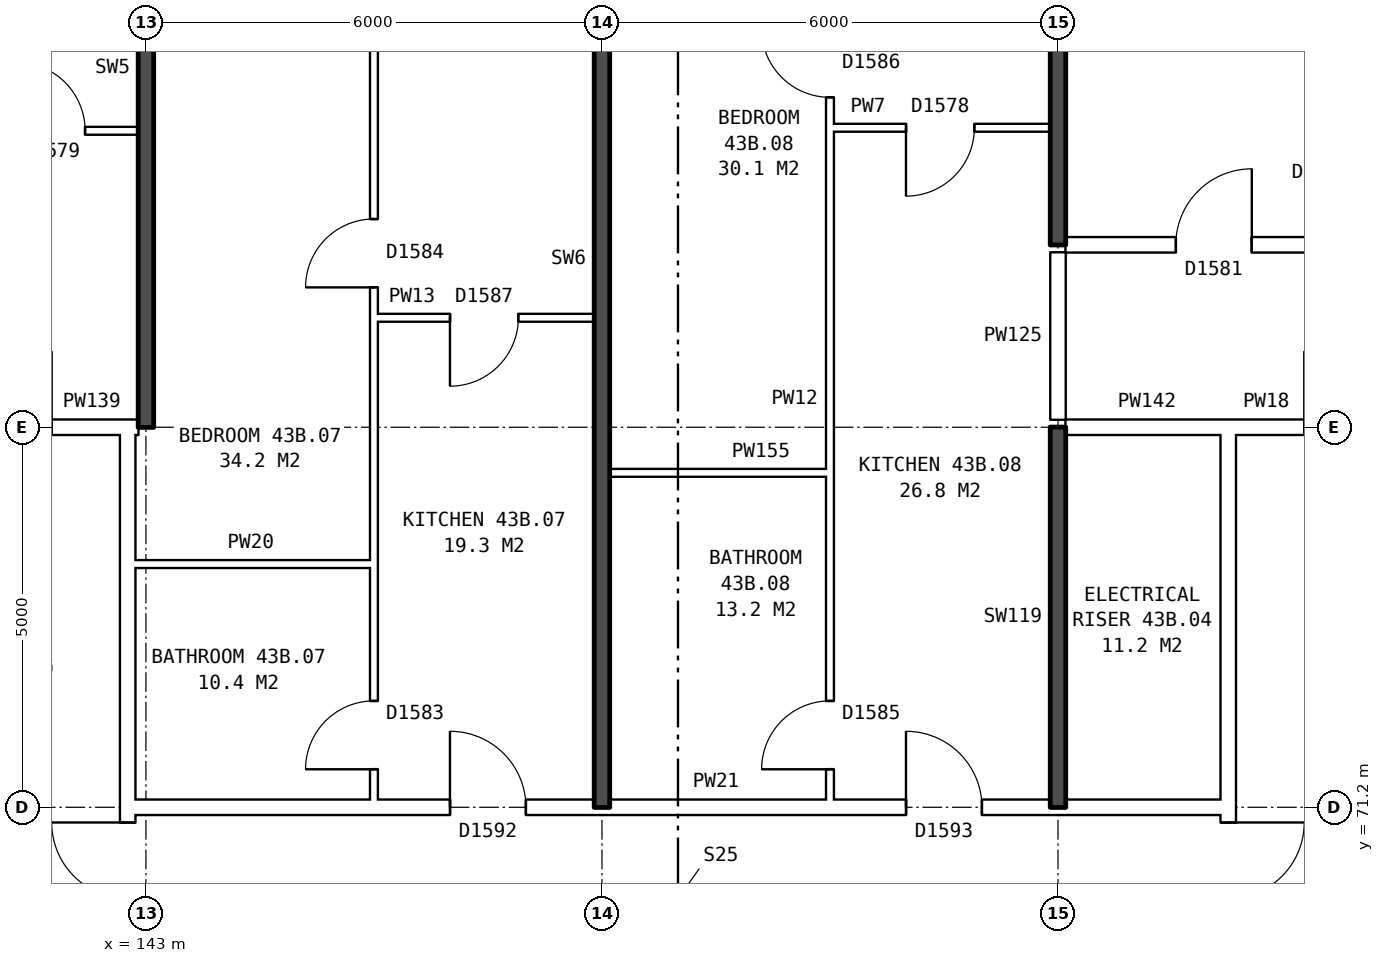
"""IFC4 building model, lengths in metres.
Left out: names, types, materials, properties, quantities, classifications, styles, units other than length and angle.
Written with IfcOpenShell. Run it as: python <this file> out.ifc"""

import sys

from ifc_helpers import new_model, si_unit, direction, frame, frame_2d, origin, place, context, subcontext, project, spatial, rectangle, extrude, element, fill, save


model = new_model("IFC4")
c1 = context("Model", 3, precision=1e-05, world=origin(), true_north=direction((0.0, 1.0)))
c2 = subcontext(c1, "Body", "Model", "MODEL_VIEW")
j1 = project(units=[si_unit("LENGTHUNIT", "METRE"), si_unit("PLANEANGLEUNIT", "RADIAN")], contexts=[c1])
p1 = place(None, origin())
s1 = spatial("IfcSite", under=j1, at=p1, CompositionType="ELEMENT")
p2 = place(p1, origin())
s2 = spatial("IfcBuilding", under=s1, at=p2, CompositionType="ELEMENT")
p3 = place(p2, frame((0.0, 0.0, 154.7)))
s3 = spatial("IfcBuildingStorey", under=s2, at=p3, CompositionType="ELEMENT", Elevation=154.7)
p4 = place(p3, frame((142.76, 63.9, 0.0), z_axis=(0.0, 0.0, 1.0), x_axis=(0.0, 1.0, 0.0)))
e1 = element("IfcWall", 1, at=p4, inside=s3, PredefinedType="PARTITIONING", context=c2, shape_type="SweptSolid", body=[
    extrude(rectangle(XDim=12.2, YDim=0.2, at=frame_2d((6.1, 0.0))), origin(), (0.0, 0.0, 1.0), 2.85),
])
p5 = place(p4, frame((5.1, 0.0, 0.0)))
e2 = element("IfcOpeningElement", 2, at=p5, cuts=e1, PredefinedType="OPENING", context=c2, shape_type="SweptSolid", body=[
    extrude(rectangle(XDim=2.0, YDim=2.1, at=frame_2d((1.0, 1.05))), frame((0.0, 0.11, 0.0), z_axis=(0.0, -1.0, 0.0), x_axis=(1.0, 0.0, 0.0)), (0.0, 0.0, 1.0), 0.22),
])
p6 = place(p3, frame((157.24, 63.9, 0.0), z_axis=(0.0, 0.0, 1.0), x_axis=(0.0, 1.0, 0.0)))
e3 = element("IfcWall", 3, at=p6, inside=s3, PredefinedType="PARTITIONING", context=c2, shape_type="SweptSolid", body=[
    extrude(rectangle(XDim=12.2, YDim=0.2, at=frame_2d((6.1, 0.0))), origin(), (0.0, 0.0, 1.0), 2.85),
])
p7 = place(p6, frame((5.1, 0.0, 0.0)))
e4 = element("IfcOpeningElement", 4, at=p7, cuts=e3, PredefinedType="OPENING", context=c2, shape_type="SweptSolid", body=[
    extrude(rectangle(XDim=2.0, YDim=2.1, at=frame_2d((1.0, 1.05))), frame((0.0, 0.11, 0.0), z_axis=(0.0, -1.0, 0.0), x_axis=(1.0, 0.0, 0.0)), (0.0, 0.0, 1.0), 0.22),
])
p8 = place(p3, frame((142.76, 71.2, 0.0), z_axis=(0.0, 0.0, 1.0), x_axis=(1.0, 0.0, 0.0)))
e5 = element("IfcWall", 5, at=p8, inside=s3, PredefinedType="PARTITIONING", context=c2, shape_type="SweptSolid", body=[
    extrude(rectangle(XDim=14.48, YDim=0.2, at=frame_2d((7.24, 0.0))), origin(), (0.0, 0.0, 1.0), 2.85),
])
p9 = place(p8, frame((4.24, 0.0, 0.0)))
e6 = element("IfcOpeningElement", 6, at=p9, cuts=e5, PredefinedType="OPENING", context=c2, shape_type="SweptSolid", body=[
    extrude(rectangle(XDim=1.0, YDim=2.1, at=frame_2d((0.5, 1.05))), frame((0.0, 0.11, 0.0), z_axis=(0.0, -1.0, 0.0), x_axis=(1.0, 0.0, 0.0)), (0.0, 0.0, 1.0), 0.22),
])
p10 = place(p8, frame((10.24, 0.0, 0.0)))
e7 = element("IfcOpeningElement", 7, at=p10, cuts=e5, PredefinedType="OPENING", context=c2, shape_type="SweptSolid", body=[
    extrude(rectangle(XDim=1.0, YDim=2.1, at=frame_2d((0.5, 1.05))), frame((0.0, 0.11, 0.0), z_axis=(0.0, -1.0, 0.0), x_axis=(1.0, 0.0, 0.0)), (0.0, 0.0, 1.0), 0.22),
])
p11 = place(p3, frame((142.76, 74.4, 0.0), z_axis=(0.0, 0.0, 1.0), x_axis=(1.0, 0.0, 0.0)))
e8 = element("IfcWall", 8, at=p11, inside=s3, PredefinedType="PARTITIONING", context=c2, shape_type="SweptSolid", body=[
    extrude(rectangle(XDim=3.24, YDim=0.1, at=frame_2d((1.62, 0.0))), origin(), (0.0, 0.0, 1.0), 2.85),
])
p12 = place(p3, frame((149.1, 75.6, 0.0), z_axis=(0.0, 0.0, 1.0), x_axis=(1.0, 0.0, 0.0)))
e9 = element("IfcWall", 9, at=p12, inside=s3, PredefinedType="PARTITIONING", context=c2, shape_type="SweptSolid", body=[
    extrude(rectangle(XDim=2.9, YDim=0.1, at=frame_2d((1.45, 0.0))), origin(), (0.0, 0.0, 1.0), 2.85),
])
p13 = place(p3, frame((139.76, 76.2, 0.0), z_axis=(0.0, 0.0, 1.0), x_axis=(1.0, 0.0, 0.0)))
e10 = element("IfcWall", 10, at=p13, inside=s3, PredefinedType="PARTITIONING", context=c2, shape_type="SweptSolid", body=[
    extrude(rectangle(XDim=3.0, YDim=0.2, at=frame_2d((1.5, 0.0))), origin(), (0.0, 0.0, 1.0), 2.85),
])
p14 = place(p13, frame((1.0, 0.0, 0.0)))
e11 = element("IfcOpeningElement", 11, at=p14, cuts=e10, PredefinedType="OPENING", context=c2, shape_type="SweptSolid", body=[
    extrude(rectangle(XDim=1.0, YDim=2.1, at=frame_2d((0.5, 1.05))), frame((0.0, 0.11, 0.0), z_axis=(0.0, -1.0, 0.0), x_axis=(1.0, 0.0, 0.0)), (0.0, 0.0, 1.0), 0.22),
])
p15 = place(p3, frame((142.76, 76.2, 0.0), z_axis=(0.0, 0.0, 1.0), x_axis=(1.0, 0.0, 0.0)))
e12 = element("IfcWall", 12, at=p15, inside=s3, PredefinedType="PARTITIONING", context=c2, shape_type="SweptSolid", body=[
    extrude(rectangle(XDim=0.14, YDim=0.2, at=frame_2d((0.07, 0.0))), origin(), (0.0, 0.0, 1.0), 2.85),
])
p16 = place(p3, frame((155.1, 76.2, 0.0), z_axis=(0.0, 0.0, 1.0), x_axis=(1.0, 0.0, 0.0)))
e13 = element("IfcWall", 13, at=p16, inside=s3, PredefinedType="PARTITIONING", context=c2, shape_type="SweptSolid", body=[
    extrude(rectangle(XDim=2.14, YDim=0.2, at=frame_2d((1.07, 0.0))), origin(), (0.0, 0.0, 1.0), 2.85),
])
p17 = place(p3, frame((157.24, 76.2, 0.0), z_axis=(0.0, 0.0, 1.0), x_axis=(1.0, 0.0, 0.0)))
e14 = element("IfcWall", 14, at=p17, inside=s3, PredefinedType="PARTITIONING", context=c2, shape_type="SweptSolid", body=[
    extrude(rectangle(XDim=3.0, YDim=0.2, at=frame_2d((1.5, 0.0))), origin(), (0.0, 0.0, 1.0), 2.85),
])
p18 = place(p17, frame((1.0, 0.0, 0.0)))
e15 = element("IfcOpeningElement", 15, at=p18, cuts=e14, PredefinedType="OPENING", context=c2, shape_type="SweptSolid", body=[
    extrude(rectangle(XDim=1.0, YDim=2.1, at=frame_2d((0.5, 1.05))), frame((0.0, 0.11, 0.0), z_axis=(0.0, -1.0, 0.0), x_axis=(1.0, 0.0, 0.0)), (0.0, 0.0, 1.0), 0.22),
])
p19 = place(p3, frame((146.0, 77.64, 0.0), z_axis=(0.0, 0.0, 1.0), x_axis=(1.0, 0.0, 0.0)))
e16 = element("IfcWall", 16, at=p19, inside=s3, PredefinedType="PARTITIONING", context=c2, shape_type="SweptSolid", body=[
    extrude(rectangle(XDim=2.9, YDim=0.1, at=frame_2d((1.45, 0.0))), origin(), (0.0, 0.0, 1.0), 2.85),
])
p20 = place(p19, frame((1.0, 0.0, 0.0)))
e17 = element("IfcOpeningElement", 17, at=p20, cuts=e16, PredefinedType="OPENING", context=c2, shape_type="SweptSolid", body=[
    extrude(rectangle(XDim=0.9, YDim=2.1, at=frame_2d((0.45, 1.05))), frame((0.0, 0.06, 0.0), z_axis=(0.0, -1.0, 0.0), x_axis=(1.0, 0.0, 0.0)), (0.0, 0.0, 1.0), 0.12),
])
p21 = place(p3, frame((155.1, 78.6, 0.0), z_axis=(0.0, 0.0, 1.0), x_axis=(1.0, 0.0, 0.0)))
e18 = element("IfcWall", 18, at=p21, inside=s3, PredefinedType="PARTITIONING", context=c2, shape_type="SweptSolid", body=[
    extrude(rectangle(XDim=16.04, YDim=0.2, at=frame_2d((8.02, 0.0))), origin(), (0.0, 0.0, 1.0), 2.85),
])
p22 = place(p21, frame((1.45, 0.0, 0.0)))
e19 = element("IfcOpeningElement", 19, at=p22, cuts=e18, PredefinedType="OPENING", context=c2, shape_type="SweptSolid", body=[
    extrude(rectangle(XDim=1.0, YDim=2.1, at=frame_2d((0.5, 1.05))), frame((0.0, 0.11, 0.0), z_axis=(0.0, -1.0, 0.0), x_axis=(1.0, 0.0, 0.0)), (0.0, 0.0, 1.0), 0.22),
])
p23 = place(p21, frame((8.4, 0.0, 0.0)))
e20 = element("IfcOpeningElement", 20, at=p23, cuts=e18, PredefinedType="OPENING", context=c2, shape_type="SweptSolid", body=[
    extrude(rectangle(XDim=1.0, YDim=2.1, at=frame_2d((0.5, 1.05))), frame((0.0, 0.11, 0.0), z_axis=(0.0, -1.0, 0.0), x_axis=(1.0, 0.0, 0.0)), (0.0, 0.0, 1.0), 0.22),
])
p24 = place(p3, frame((137.1, 80.1, 0.0), z_axis=(0.0, 0.0, 1.0), x_axis=(1.0, 0.0, 0.0)))
e21 = element("IfcWall", 21, at=p24, inside=s3, PredefinedType="PARTITIONING", context=c2, shape_type="SweptSolid", body=[
    extrude(rectangle(XDim=5.8, YDim=0.1, at=frame_2d((2.9, 0.0))), origin(), (0.0, 0.0, 1.0), 2.85),
])
p25 = place(p24, frame((1.3, 0.0, 0.0)))
e22 = element("IfcOpeningElement", 22, at=p25, cuts=e21, PredefinedType="OPENING", context=c2, shape_type="SweptSolid", body=[
    extrude(rectangle(XDim=0.9, YDim=2.1, at=frame_2d((0.45, 1.05))), frame((0.0, 0.06, 0.0), z_axis=(0.0, -1.0, 0.0), x_axis=(1.0, 0.0, 0.0)), (0.0, 0.0, 1.0), 0.12),
])
p26 = place(p24, frame((4.2, 0.0, 0.0)))
e23 = element("IfcOpeningElement", 23, at=p26, cuts=e21, PredefinedType="OPENING", context=c2, shape_type="SweptSolid", body=[
    extrude(rectangle(XDim=0.9, YDim=2.1, at=frame_2d((0.45, 1.05))), frame((0.0, 0.06, 0.0), z_axis=(0.0, -1.0, 0.0), x_axis=(1.0, 0.0, 0.0)), (0.0, 0.0, 1.0), 0.12),
])
p27 = place(p3, frame((152.0, 80.14, 0.0), z_axis=(0.0, 0.0, 1.0), x_axis=(1.0, 0.0, 0.0)))
e24 = element("IfcWall", 24, at=p27, inside=s3, PredefinedType="PARTITIONING", context=c2, shape_type="SweptSolid", body=[
    extrude(rectangle(XDim=2.9, YDim=0.1, at=frame_2d((1.45, 0.0))), origin(), (0.0, 0.0, 1.0), 2.85),
])
p28 = place(p27, frame((1.0, 0.0, 0.0)))
e25 = element("IfcOpeningElement", 25, at=p28, cuts=e24, PredefinedType="OPENING", context=c2, shape_type="SweptSolid", body=[
    extrude(rectangle(XDim=0.9, YDim=2.1, at=frame_2d((0.45, 1.05))), frame((0.0, 0.06, 0.0), z_axis=(0.0, -1.0, 0.0), x_axis=(1.0, 0.0, 0.0)), (0.0, 0.0, 1.0), 0.12),
])
p29 = place(p3, frame((143.0, 76.2, 0.0), z_axis=(0.0, 0.0, 1.0), x_axis=(0.0, 1.0, 0.0)))
e26 = element("IfcWall", 26, at=p29, inside=s3, PredefinedType="SOLIDWALL", context=c2, shape_type="SweptSolid", body=[
    extrude(rectangle(XDim=9.44, YDim=0.2, at=frame_2d((4.72, 0.0))), origin(), (0.0, 0.0, 1.0), 2.85),
])
p30 = place(p3, frame((146.0, 71.3, 0.0), z_axis=(0.0, 0.0, 1.0), x_axis=(0.0, 1.0, 0.0)))
e27 = element("IfcWall", 27, at=p30, inside=s3, PredefinedType="PARTITIONING", context=c2, shape_type="SweptSolid", body=[
    extrude(rectangle(XDim=14.34, YDim=0.1, at=frame_2d((7.17, 0.0))), origin(), (0.0, 0.0, 1.0), 2.85),
])
p31 = place(p30, frame((6.74, 0.0, 0.0)))
e28 = element("IfcOpeningElement", 28, at=p31, cuts=e27, PredefinedType="OPENING", context=c2, shape_type="SweptSolid", body=[
    extrude(rectangle(XDim=0.9, YDim=2.1, at=frame_2d((0.45, 1.05))), frame((0.0, 0.06, 0.0), z_axis=(0.0, -1.0, 0.0), x_axis=(1.0, 0.0, 0.0)), (0.0, 0.0, 1.0), 0.12),
])
p32 = place(p30, frame((0.4, 0.0, 0.0)))
e29 = element("IfcOpeningElement", 29, at=p32, cuts=e27, PredefinedType="OPENING", context=c2, shape_type="SweptSolid", body=[
    extrude(rectangle(XDim=0.9, YDim=2.1, at=frame_2d((0.45, 1.05))), frame((0.0, 0.06, 0.0), z_axis=(0.0, -1.0, 0.0), x_axis=(1.0, 0.0, 0.0)), (0.0, 0.0, 1.0), 0.12),
])
p33 = place(p3, frame((149.0, 71.2, 0.0), z_axis=(0.0, 0.0, 1.0), x_axis=(0.0, 1.0, 0.0)))
e30 = element("IfcWall", 30, at=p33, inside=s3, PredefinedType="SOLIDWALL", context=c2, shape_type="SweptSolid", body=[
    extrude(rectangle(XDim=14.44, YDim=0.2, at=frame_2d((7.22, 0.0))), origin(), (0.0, 0.0, 1.0), 2.85),
])
p34 = place(p3, frame((152.0, 71.3, 0.0), z_axis=(0.0, 0.0, 1.0), x_axis=(0.0, 1.0, 0.0)))
e31 = element("IfcWall", 31, at=p34, inside=s3, PredefinedType="PARTITIONING", context=c2, shape_type="SweptSolid", body=[
    extrude(rectangle(XDim=14.34, YDim=0.1, at=frame_2d((7.17, 0.0))), origin(), (0.0, 0.0, 1.0), 2.85),
])
p35 = place(p34, frame((9.24, 0.0, 0.0)))
e32 = element("IfcOpeningElement", 32, at=p35, cuts=e31, PredefinedType="OPENING", context=c2, shape_type="SweptSolid", body=[
    extrude(rectangle(XDim=0.9, YDim=2.1, at=frame_2d((0.45, 1.05))), frame((0.0, 0.06, 0.0), z_axis=(0.0, -1.0, 0.0), x_axis=(1.0, 0.0, 0.0)), (0.0, 0.0, 1.0), 0.12),
])
p36 = place(p34, frame((0.4, 0.0, 0.0)))
e33 = element("IfcOpeningElement", 33, at=p36, cuts=e31, PredefinedType="OPENING", context=c2, shape_type="SweptSolid", body=[
    extrude(rectangle(XDim=0.9, YDim=2.1, at=frame_2d((0.45, 1.05))), frame((0.0, 0.06, 0.0), z_axis=(0.0, -1.0, 0.0), x_axis=(1.0, 0.0, 0.0)), (0.0, 0.0, 1.0), 0.12),
])
p37 = place(p3, frame((155.0, 71.2, 0.0), z_axis=(0.0, 0.0, 1.0), x_axis=(0.0, 1.0, 0.0)))
e34 = element("IfcWall", 34, at=p37, inside=s3, PredefinedType="SOLIDWALL", context=c2, shape_type="SweptSolid", body=[
    extrude(rectangle(XDim=5.0, YDim=0.2, at=frame_2d((2.5, 0.0))), origin(), (0.0, 0.0, 1.0), 2.85),
])
p38 = place(p3, frame((155.0, 76.3, 0.0), z_axis=(0.0, 0.0, 1.0), x_axis=(0.0, 1.0, 0.0)))
e35 = element("IfcWall", 35, at=p38, inside=s3, PredefinedType="PARTITIONING", context=c2, shape_type="SweptSolid", body=[
    extrude(rectangle(XDim=2.2, YDim=0.2, at=frame_2d((1.1, 0.0))), origin(), (0.0, 0.0, 1.0), 2.85),
])
p39 = place(p3, frame((155.0, 78.6, 0.0), z_axis=(0.0, 0.0, 1.0), x_axis=(0.0, 1.0, 0.0)))
e36 = element("IfcWall", 36, at=p39, inside=s3, PredefinedType="SOLIDWALL", context=c2, shape_type="SweptSolid", body=[
    extrude(rectangle(XDim=7.04, YDim=0.2, at=frame_2d((3.52, 0.0))), origin(), (0.0, 0.0, 1.0), 2.85),
])
p40 = place(p5, origin())
e37 = element("IfcDoor", 37, at=p40, inside=s3, OperationType="DOUBLE_DOOR_SINGLE_SWING", PredefinedType="DOOR", context=c2, shape_type="SweptSolid", body=[
    extrude(rectangle(XDim=2.0, YDim=2.1, at=frame_2d((1.0, 1.05))), frame((0.0, 0.025, 0.0), z_axis=(0.0, -1.0, 0.0), x_axis=(1.0, 0.0, 0.0)), (0.0, 0.0, 1.0), 0.05),
])
fill(e2, e37)
p41 = place(p7, frame((2.0, 0.0, 0.0), z_axis=(0.0, 0.0, 1.0), x_axis=(-1.0, 0.0, 0.0)))
e38 = element("IfcDoor", 38, at=p41, inside=s3, OperationType="DOUBLE_DOOR_SINGLE_SWING", PredefinedType="DOOR", context=c2, shape_type="SweptSolid", body=[
    extrude(rectangle(XDim=2.0, YDim=2.1, at=frame_2d((1.0, 1.05))), frame((0.0, 0.025, 0.0), z_axis=(0.0, -1.0, 0.0), x_axis=(1.0, 0.0, 0.0)), (0.0, 0.0, 1.0), 0.05),
])
fill(e4, e38)
p42 = place(p26, origin())
e39 = element("IfcDoor", 39, at=p42, inside=s3, OperationType="SINGLE_SWING_LEFT", PredefinedType="DOOR", context=c2, shape_type="SweptSolid", body=[
    extrude(rectangle(XDim=0.9, YDim=2.1, at=frame_2d((0.45, 1.05))), frame((0.0, 0.025, 0.0), z_axis=(0.0, -1.0, 0.0), x_axis=(1.0, 0.0, 0.0)), (0.0, 0.0, 1.0), 0.05),
])
fill(e23, e39)
p43 = place(p31, origin())
e40 = element("IfcDoor", 40, at=p43, inside=s3, OperationType="SINGLE_SWING_LEFT", PredefinedType="DOOR", context=c2, shape_type="SweptSolid", body=[
    extrude(rectangle(XDim=0.9, YDim=2.1, at=frame_2d((0.45, 1.05))), frame((0.0, 0.025, 0.0), z_axis=(0.0, -1.0, 0.0), x_axis=(1.0, 0.0, 0.0)), (0.0, 0.0, 1.0), 0.05),
])
fill(e28, e40)
p44 = place(p9, origin())
e41 = element("IfcDoor", 41, at=p44, inside=s3, OperationType="SINGLE_SWING_LEFT", PredefinedType="DOOR", context=c2, shape_type="SweptSolid", body=[
    extrude(rectangle(XDim=1.0, YDim=2.1, at=frame_2d((0.5, 1.05))), frame((0.0, 0.025, 0.0), z_axis=(0.0, -1.0, 0.0), x_axis=(1.0, 0.0, 0.0)), (0.0, 0.0, 1.0), 0.05),
])
fill(e6, e41)
p45 = place(p20, frame((0.9, 0.0, 0.0), z_axis=(0.0, 0.0, 1.0), x_axis=(-1.0, 0.0, 0.0)))
e42 = element("IfcDoor", 42, at=p45, inside=s3, OperationType="SINGLE_SWING_RIGHT", PredefinedType="DOOR", context=c2, shape_type="SweptSolid", body=[
    extrude(rectangle(XDim=0.9, YDim=2.1, at=frame_2d((0.45, 1.05))), frame((0.0, 0.025, 0.0), z_axis=(0.0, -1.0, 0.0), x_axis=(1.0, 0.0, 0.0)), (0.0, 0.0, 1.0), 0.05),
])
fill(e17, e42)
p46 = place(p32, origin())
e43 = element("IfcDoor", 43, at=p46, inside=s3, OperationType="SINGLE_SWING_LEFT", PredefinedType="DOOR", context=c2, shape_type="SweptSolid", body=[
    extrude(rectangle(XDim=0.9, YDim=2.1, at=frame_2d((0.45, 1.05))), frame((0.0, 0.025, 0.0), z_axis=(0.0, -1.0, 0.0), x_axis=(1.0, 0.0, 0.0)), (0.0, 0.0, 1.0), 0.05),
])
fill(e29, e43)
p47 = place(p35, origin())
e44 = element("IfcDoor", 44, at=p47, inside=s3, OperationType="SINGLE_SWING_RIGHT", PredefinedType="DOOR", context=c2, shape_type="SweptSolid", body=[
    extrude(rectangle(XDim=0.9, YDim=2.1, at=frame_2d((0.45, 1.05))), frame((0.0, 0.025, 0.0), z_axis=(0.0, -1.0, 0.0), x_axis=(1.0, 0.0, 0.0)), (0.0, 0.0, 1.0), 0.05),
])
fill(e32, e44)
p48 = place(p10, origin())
e45 = element("IfcDoor", 45, at=p48, inside=s3, OperationType="SINGLE_SWING_LEFT", PredefinedType="DOOR", context=c2, shape_type="SweptSolid", body=[
    extrude(rectangle(XDim=1.0, YDim=2.1, at=frame_2d((0.5, 1.05))), frame((0.0, 0.025, 0.0), z_axis=(0.0, -1.0, 0.0), x_axis=(1.0, 0.0, 0.0)), (0.0, 0.0, 1.0), 0.05),
])
fill(e7, e45)
p49 = place(p28, frame((0.9, 0.0, 0.0), z_axis=(0.0, 0.0, 1.0), x_axis=(-1.0, 0.0, 0.0)))
e46 = element("IfcDoor", 46, at=p49, inside=s3, OperationType="SINGLE_SWING_RIGHT", PredefinedType="DOOR", context=c2, shape_type="SweptSolid", body=[
    extrude(rectangle(XDim=0.9, YDim=2.1, at=frame_2d((0.45, 1.05))), frame((0.0, 0.025, 0.0), z_axis=(0.0, -1.0, 0.0), x_axis=(1.0, 0.0, 0.0)), (0.0, 0.0, 1.0), 0.05),
])
fill(e25, e46)
p50 = place(p36, origin())
e47 = element("IfcDoor", 47, at=p50, inside=s3, OperationType="SINGLE_SWING_LEFT", PredefinedType="DOOR", context=c2, shape_type="SweptSolid", body=[
    extrude(rectangle(XDim=0.9, YDim=2.1, at=frame_2d((0.45, 1.05))), frame((0.0, 0.025, 0.0), z_axis=(0.0, -1.0, 0.0), x_axis=(1.0, 0.0, 0.0)), (0.0, 0.0, 1.0), 0.05),
])
fill(e33, e47)
p51 = place(p22, origin())
e48 = element("IfcDoor", 48, at=p51, inside=s3, OperationType="SINGLE_SWING_RIGHT", PredefinedType="DOOR", context=c2, shape_type="SweptSolid", body=[
    extrude(rectangle(XDim=1.0, YDim=2.1, at=frame_2d((0.5, 1.05))), frame((0.0, 0.025, 0.0), z_axis=(0.0, -1.0, 0.0), x_axis=(1.0, 0.0, 0.0)), (0.0, 0.0, 1.0), 0.05),
])
fill(e19, e48)
save(model, sys.argv[1])
